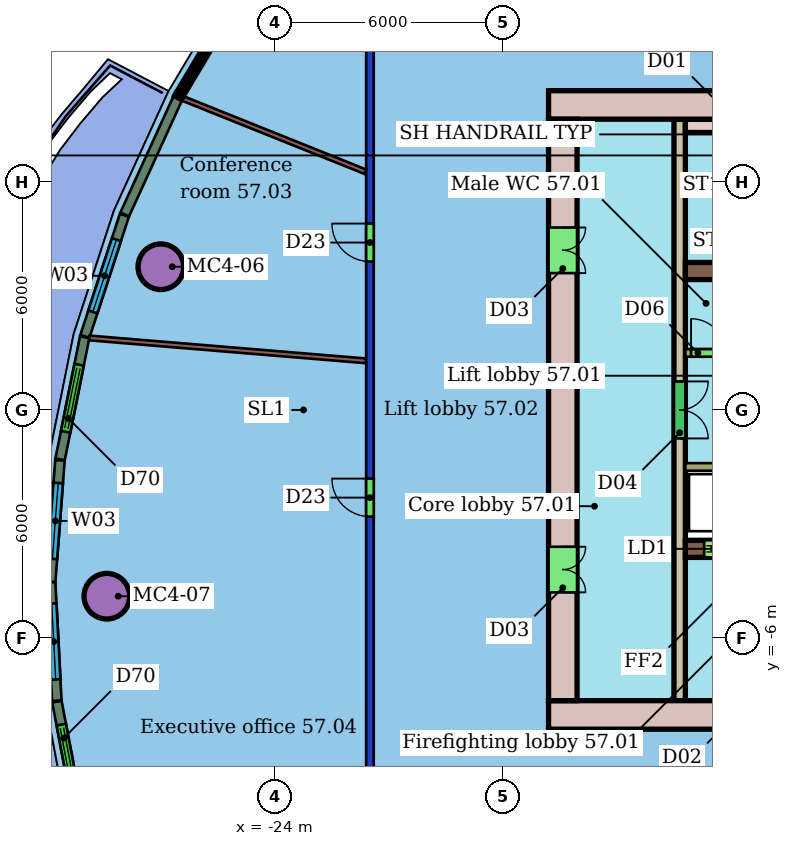
"""IFC4 building model, lengths in metres.
Left out: names, types, materials, properties, quantities, classifications, styles, units other than length and angle.
Written with IfcOpenShell. Run it as: python <this file> out.ifc"""

import sys

from ifc_helpers import new_model, si_unit, direction, frame, frame_2d, origin, origin_2d, place, context, subcontext, project, spatial, rectangle, hollow_circle, extrude, element, fill, save


model = new_model("IFC4")
c1 = context("Model", 3, precision=1e-05, world=origin(), true_north=direction((0.0, 1.0)))
c2 = subcontext(c1, "Body", "Model", "MODEL_VIEW")
j1 = project(units=[si_unit("LENGTHUNIT", "METRE"), si_unit("PLANEANGLEUNIT", "RADIAN")], contexts=[c1])
p1 = place(None, origin())
s1 = spatial("IfcSite", under=j1, at=p1, CompositionType="ELEMENT")
p2 = place(p1, origin())
s2 = spatial("IfcBuilding", under=s1, at=p2, CompositionType="ELEMENT")
p3 = place(p2, frame((0.0, 0.0, 231.7)))
s3 = spatial("IfcBuildingStorey", under=s2, at=p3, CompositionType="ELEMENT", Elevation=231.7)
for number, where, z_axis, x_axis in (
    (1, (-27.003, 3.768, 0.0), (0.0, 0.0, 1.0), (1.0, 0.0, 0.0)),
    (2, (-28.424, -4.901, 0.0), (0.0, 0.0, 1.0), (1.0, 0.0, 0.0)),
):
    element("IfcColumn", number, at=place(p3, frame(where, z_axis=z_axis, x_axis=x_axis)), inside=s3, PredefinedType="COLUMN", context=c2, shape_type="SweptSolid", body=[
        extrude(hollow_circle(Radius=0.6, WallThickness=0.045, at=origin_2d()), origin(), (0.0, 0.0, 1.0), 3.45),
    ])
p4 = place(p3, frame((-21.5, -10.4, 0.0), z_axis=(0.0, 0.0, 1.0), x_axis=(0.0, 1.0, 0.0)))
e3 = element("IfcWall", 3, at=p4, inside=s3, PredefinedType="PARTITIONING", context=c2, shape_type="SweptSolid", body=[
    extrude(rectangle(XDim=20.8, YDim=0.2, at=frame_2d((10.4, 0.0))), origin(), (0.0, 0.0, 1.0), 3.05),
])
p5 = place(p4, frame((14.304, 0.0, 0.0)))
e4 = element("IfcOpeningElement", 4, at=p5, cuts=e3, PredefinedType="OPENING", context=c2, shape_type="SweptSolid", body=[
    extrude(rectangle(XDim=1.0, YDim=2.4, at=frame_2d((0.5, 1.2))), frame((0.0, 0.11, 0.0), z_axis=(0.0, -1.0, 0.0), x_axis=(1.0, 0.0, 0.0)), (0.0, 0.0, 1.0), 0.22),
])
p6 = place(p4, frame((7.593, 0.0, 0.0)))
e5 = element("IfcOpeningElement", 5, at=p6, cuts=e3, PredefinedType="OPENING", context=c2, shape_type="SweptSolid", body=[
    extrude(rectangle(XDim=1.0, YDim=2.4, at=frame_2d((0.5, 1.2))), frame((0.0, 0.11, 0.0), z_axis=(0.0, -1.0, 0.0), x_axis=(1.0, 0.0, 0.0)), (0.0, 0.0, 1.0), 0.22),
])
p7 = place(p3, frame((-26.423, 8.194, 0.0), z_axis=(0.0, 0.0, 1.0), x_axis=(0.928078954296, -0.372383477872, 0.0)))
e6 = element("IfcWall", 6, at=p7, inside=s3, PredefinedType="PARTITIONING", context=c2, shape_type="SweptSolid", body=[
    extrude(rectangle(XDim=5.171, YDim=0.125, at=frame_2d((2.586, 0.0))), origin(), (0.0, 0.0, 1.0), 3.45),
])
p8 = place(p3, frame((-28.884, 1.894, 0.0), z_axis=(0.0, 0.0, 1.0), x_axis=(0.996590797754, -0.08250322316, 0.0)))
e7 = element("IfcWall", 7, at=p8, inside=s3, PredefinedType="PARTITIONING", context=c2, shape_type="SweptSolid", body=[
    extrude(rectangle(XDim=7.303, YDim=0.125, at=frame_2d((3.652, 0.0))), origin(), (0.0, 0.0, 1.0), 3.45),
])
p9 = place(p3, frame((-26.556, 8.202, 0.0), z_axis=(0.0, 0.0, 1.0), x_axis=(-0.415284514337, -0.909691580785, 0.0)))
e8 = element("IfcWall", 8, at=p9, inside=s3, PredefinedType="SOLIDWALL", context=c2, shape_type="SweptSolid", body=[
    extrude(rectangle(XDim=3.363, YDim=0.25, at=frame_2d((1.682, 0.0))), origin(), (0.0, 0.0, 1.0), 3.1),
])
p10 = place(p3, frame((-27.961, 5.122, 0.0), z_axis=(0.0, 0.0, 1.0), x_axis=(-0.310298321168, -0.950639233295, 0.0)))
e9 = element("IfcWall", 9, at=p10, inside=s3, PredefinedType="SOLIDWALL", context=c2, shape_type="SweptSolid", body=[
    extrude(rectangle(XDim=3.351, YDim=0.25, at=frame_2d((1.676, 0.0))), origin(), (0.0, 0.0, 1.0), 3.1),
])
p11 = place(p10, frame((0.676, 0.0, 0.9)))
e10 = element("IfcOpeningElement", 10, at=p11, cuts=e9, PredefinedType="OPENING", context=c2, shape_type="SweptSolid", body=[
    extrude(rectangle(XDim=2.0, YDim=2.1, at=frame_2d((1.0, 1.05))), frame((0.0, 0.135, 0.0), z_axis=(0.0, -1.0, 0.0), x_axis=(1.0, 0.0, 0.0)), (0.0, 0.0, 1.0), 0.27),
])
p12 = place(p3, frame((-29.007, 1.915, 0.0), z_axis=(0.0, 0.0, 1.0), x_axis=(-0.197275160693, -0.980348158041, 0.0)))
e11 = element("IfcWall", 11, at=p12, inside=s3, PredefinedType="SOLIDWALL", context=c2, shape_type="SweptSolid", body=[
    extrude(rectangle(XDim=3.281, YDim=0.25, at=frame_2d((1.64, 0.0))), origin(), (0.0, 0.0, 1.0), 3.1),
])
p13 = place(p12, frame((0.74, 0.0, 0.0)))
e12 = element("IfcOpeningElement", 12, at=p13, cuts=e11, PredefinedType="OPENING", context=c2, shape_type="SweptSolid", body=[
    extrude(rectangle(XDim=1.8, YDim=2.4, at=frame_2d((0.9, 1.2))), frame((0.0, 0.135, 0.0), z_axis=(0.0, -1.0, 0.0), x_axis=(1.0, 0.0, 0.0)), (0.0, 0.0, 1.0), 0.27),
])
p14 = place(p3, frame((-29.657, -1.324, 0.0), z_axis=(0.0, 0.0, 1.0), x_axis=(-0.076358161895, -0.997080453681, 0.0)))
e13 = element("IfcWall", 13, at=p14, inside=s3, PredefinedType="SOLIDWALL", context=c2, shape_type="SweptSolid", body=[
    extrude(rectangle(XDim=3.2, YDim=0.25, at=frame_2d((1.6, 0.0))), origin(), (0.0, 0.0, 1.0), 3.1),
])
p15 = place(p14, frame((0.6, 0.0, 0.9)))
e14 = element("IfcOpeningElement", 14, at=p15, cuts=e13, PredefinedType="OPENING", context=c2, shape_type="SweptSolid", body=[
    extrude(rectangle(XDim=2.0, YDim=2.1, at=frame_2d((1.0, 1.05))), frame((0.0, 0.135, 0.0), z_axis=(0.0, -1.0, 0.0), x_axis=(1.0, 0.0, 0.0)), (0.0, 0.0, 1.0), 0.27),
])
p16 = place(p3, frame((-29.902, -4.54, 0.0), z_axis=(0.0, 0.0, 1.0), x_axis=(0.051884190685, -0.99865310832, 0.0)))
e15 = element("IfcWall", 15, at=p16, inside=s3, PredefinedType="SOLIDWALL", context=c2, shape_type="SweptSolid", body=[
    extrude(rectangle(XDim=3.115, YDim=0.25, at=frame_2d((1.558, 0.0))), origin(), (0.0, 0.0, 1.0), 3.1),
])
p17 = place(p16, frame((0.558, 0.0, 0.9)))
e16 = element("IfcOpeningElement", 16, at=p17, cuts=e15, PredefinedType="OPENING", context=c2, shape_type="SweptSolid", body=[
    extrude(rectangle(XDim=2.0, YDim=2.1, at=frame_2d((1.0, 1.05))), frame((0.0, 0.135, 0.0), z_axis=(0.0, -1.0, 0.0), x_axis=(1.0, 0.0, 0.0)), (0.0, 0.0, 1.0), 0.27),
])
p18 = place(p3, frame((-29.737, -7.675, 0.0), z_axis=(0.0, 0.0, 1.0), x_axis=(0.186112401934, -0.982528459561, 0.0)))
e17 = element("IfcWall", 17, at=p18, inside=s3, PredefinedType="SOLIDWALL", context=c2, shape_type="SweptSolid", body=[
    extrude(rectangle(XDim=3.03, YDim=0.25, at=frame_2d((1.515, 0.0))), origin(), (0.0, 0.0, 1.0), 3.1),
])
p19 = place(p18, frame((0.615, 0.0, 0.0)))
e18 = element("IfcOpeningElement", 18, at=p19, cuts=e17, PredefinedType="OPENING", context=c2, shape_type="SweptSolid", body=[
    extrude(rectangle(XDim=1.8, YDim=2.4, at=frame_2d((0.9, 1.2))), frame((0.0, 0.135, 0.0), z_axis=(0.0, -1.0, 0.0), x_axis=(1.0, 0.0, 0.0)), (0.0, 0.0, 1.0), 0.27),
])
p20 = place(p3, frame((-6.0, 8.025, 0.0), z_axis=(0.0, 0.0, 1.0), x_axis=(-1.0, 0.0, 0.0)))
e19 = element("IfcWall", 19, at=p20, inside=s3, PredefinedType="SHEAR", context=c2, shape_type="SweptSolid", body=[
    extrude(rectangle(XDim=10.8, YDim=0.75, at=frame_2d((5.4, 0.0))), origin(), (0.0, 0.0, 1.0), 3.3),
])
p21 = place(p20, frame((5.2, 0.0, 0.0)))
e20 = element("IfcOpeningElement", 20, at=p21, cuts=e19, PredefinedType="OPENING", context=c2, shape_type="SweptSolid", body=[
    extrude(rectangle(XDim=1.2, YDim=2.1, at=frame_2d((0.6, 1.05))), frame((0.0, 0.385, 0.0), z_axis=(0.0, -1.0, 0.0), x_axis=(1.0, 0.0, 0.0)), (0.0, 0.0, 1.0), 0.77),
])
p22 = place(p3, frame((-16.8, -8.025, 0.0), z_axis=(0.0, 0.0, 1.0), x_axis=(1.0, 0.0, 0.0)))
e21 = element("IfcWall", 21, at=p22, inside=s3, PredefinedType="SHEAR", context=c2, shape_type="SweptSolid", body=[
    extrude(rectangle(XDim=21.6, YDim=0.75, at=frame_2d((10.8, 0.0))), origin(), (0.0, 0.0, 1.0), 3.3),
])
p23 = place(p22, frame((4.8, 0.0, 0.0)))
e22 = element("IfcOpeningElement", 22, at=p23, cuts=e21, PredefinedType="OPENING", context=c2, shape_type="SweptSolid", body=[
    extrude(rectangle(XDim=1.2, YDim=2.1, at=frame_2d((0.6, 1.05))), frame((0.0, 0.385, 0.0), z_axis=(0.0, -1.0, 0.0), x_axis=(1.0, 0.0, 0.0)), (0.0, 0.0, 1.0), 0.77),
])
p24 = place(p3, frame((-16.425, 7.65, 0.0), z_axis=(0.0, 0.0, 1.0), x_axis=(0.0, -1.0, 0.0)))
e23 = element("IfcWall", 23, at=p24, inside=s3, PredefinedType="SHEAR", context=c2, shape_type="SweptSolid", body=[
    extrude(rectangle(XDim=15.3, YDim=0.75, at=frame_2d((7.65, 0.0))), origin(), (0.0, 0.0, 1.0), 3.3),
])
p25 = place(p24, frame((11.25, 0.0, 0.0)))
e24 = element("IfcOpeningElement", 24, at=p25, cuts=e23, PredefinedType="OPENING", context=c2, shape_type="SweptSolid", body=[
    extrude(rectangle(XDim=1.2, YDim=2.1, at=frame_2d((0.6, 1.05))), frame((0.0, 0.385, 0.0), z_axis=(0.0, -1.0, 0.0), x_axis=(1.0, 0.0, 0.0)), (0.0, 0.0, 1.0), 0.77),
])
p26 = place(p24, frame((2.85, 0.0, 0.0)))
e25 = element("IfcOpeningElement", 25, at=p26, cuts=e23, PredefinedType="OPENING", context=c2, shape_type="SweptSolid", body=[
    extrude(rectangle(XDim=1.2, YDim=2.1, at=frame_2d((0.6, 1.05))), frame((0.0, 0.385, 0.0), z_axis=(0.0, -1.0, 0.0), x_axis=(1.0, 0.0, 0.0)), (0.0, 0.0, 1.0), 0.77),
])
p27 = place(p3, frame((-13.2, 3.655, 0.0), z_axis=(0.0, 0.0, 1.0), x_axis=(1.0, 0.0, 0.0)))
e26 = element("IfcWall", 26, at=p27, inside=s3, PredefinedType="SHEAR", context=c2, shape_type="SweptSolid", body=[
    extrude(rectangle(XDim=7.2, YDim=0.45, at=frame_2d((3.6, 0.0))), origin(), (0.0, 0.0, 1.0), 3.3),
])
p28 = place(p3, frame((-13.2, -3.655, 0.0), z_axis=(0.0, 0.0, 1.0), x_axis=(1.0, 0.0, 0.0)))
e27 = element("IfcWall", 27, at=p28, inside=s3, PredefinedType="SHEAR", context=c2, shape_type="SweptSolid", body=[
    extrude(rectangle(XDim=7.2, YDim=0.45, at=frame_2d((3.6, 0.0))), origin(), (0.0, 0.0, 1.0), 3.3),
])
p29 = place(p28, frame((0.496, 0.0, 0.0)))
e28 = element("IfcOpeningElement", 28, at=p29, cuts=e27, PredefinedType="OPENING", context=c2, shape_type="SweptSolid", body=[
    extrude(rectangle(XDim=1.2, YDim=2.1, at=frame_2d((0.6, 1.05))), frame((0.0, 0.235, 0.0), z_axis=(0.0, -1.0, 0.0), x_axis=(1.0, 0.0, 0.0)), (0.0, 0.0, 1.0), 0.47),
])
p30 = place(p28, frame((2.938, 0.0, 0.0)))
e29 = element("IfcOpeningElement", 29, at=p30, cuts=e27, PredefinedType="OPENING", context=c2, shape_type="SweptSolid", body=[
    extrude(rectangle(XDim=1.2, YDim=2.1, at=frame_2d((0.6, 1.05))), frame((0.0, 0.235, 0.0), z_axis=(0.0, -1.0, 0.0), x_axis=(1.0, 0.0, 0.0)), (0.0, 0.0, 1.0), 0.47),
])
p31 = place(p3, frame((-13.35, 7.65, 0.0), z_axis=(0.0, 0.0, 1.0), x_axis=(0.0, -1.0, 0.0)))
e30 = element("IfcWall", 30, at=p31, inside=s3, PredefinedType="SHEAR", context=c2, shape_type="SweptSolid", body=[
    extrude(rectangle(XDim=15.3, YDim=0.3, at=frame_2d((7.65, 0.0))), origin(), (0.0, 0.0, 1.0), 3.3),
])
p32 = place(p31, frame((6.9, 0.0, 0.0)))
e31 = element("IfcOpeningElement", 31, at=p32, cuts=e30, PredefinedType="OPENING", context=c2, shape_type="SweptSolid", body=[
    extrude(rectangle(XDim=1.5, YDim=2.1, at=frame_2d((0.75, 1.05))), frame((0.0, 0.16, 0.0), z_axis=(0.0, -1.0, 0.0), x_axis=(1.0, 0.0, 0.0)), (0.0, 0.0, 1.0), 0.32),
])
p33 = place(p3, frame((-13.2, 1.5, 0.0), z_axis=(0.0, 0.0, 1.0), x_axis=(1.0, 0.0, 0.0)))
e32 = element("IfcWall", 32, at=p33, inside=s3, PredefinedType="SHEAR", context=c2, shape_type="SweptSolid", body=[
    extrude(rectangle(XDim=14.4, YDim=0.2, at=frame_2d((7.2, 0.0))), origin(), (0.0, 0.0, 1.0), 3.3),
])
p34 = place(p33, frame((10.312, 0.0, 0.0)))
e33 = element("IfcOpeningElement", 33, at=p34, cuts=e32, PredefinedType="OPENING", context=c2, shape_type="SweptSolid", body=[
    extrude(rectangle(XDim=1.1, YDim=2.1, at=frame_2d((0.55, 1.05))), frame((0.0, 0.11, 0.0), z_axis=(0.0, -1.0, 0.0), x_axis=(1.0, 0.0, 0.0)), (0.0, 0.0, 1.0), 0.22),
])
p35 = place(p33, frame((12.754, 0.0, 0.0)))
e34 = element("IfcOpeningElement", 34, at=p35, cuts=e32, PredefinedType="OPENING", context=c2, shape_type="SweptSolid", body=[
    extrude(rectangle(XDim=1.1, YDim=2.1, at=frame_2d((0.55, 1.05))), frame((0.0, 0.11, 0.0), z_axis=(0.0, -1.0, 0.0), x_axis=(1.0, 0.0, 0.0)), (0.0, 0.0, 1.0), 0.22),
])
p36 = place(p33, frame((0.15, 0.0, 0.0)))
e35 = element("IfcOpeningElement", 35, at=p36, cuts=e32, PredefinedType="OPENING", context=c2, shape_type="SweptSolid", body=[
    extrude(rectangle(XDim=0.9, YDim=2.1, at=frame_2d((0.45, 1.05))), frame((0.0, 0.11, 0.0), z_axis=(0.0, -1.0, 0.0), x_axis=(1.0, 0.0, 0.0)), (0.0, 0.0, 1.0), 0.22),
])
p37 = place(p33, frame((3.365, 0.0, 0.0)))
e36 = element("IfcOpeningElement", 36, at=p37, cuts=e32, PredefinedType="OPENING", context=c2, shape_type="SweptSolid", body=[
    extrude(rectangle(XDim=1.0, YDim=2.1, at=frame_2d((0.5, 1.05))), frame((0.0, 0.11, 0.0), z_axis=(0.0, -1.0, 0.0), x_axis=(1.0, 0.0, 0.0)), (0.0, 0.0, 1.0), 0.22),
])
p38 = place(p33, frame((8.467, 0.0, 0.0)))
e37 = element("IfcOpeningElement", 37, at=p38, cuts=e32, PredefinedType="OPENING", context=c2, shape_type="SweptSolid", body=[
    extrude(rectangle(XDim=0.9, YDim=2.1, at=frame_2d((0.45, 1.05))), frame((0.0, 0.11, 0.0), z_axis=(0.0, -1.0, 0.0), x_axis=(1.0, 0.0, 0.0)), (0.0, 0.0, 1.0), 0.22),
])
p39 = place(p3, frame((1.2, -1.5, 0.0), z_axis=(0.0, 0.0, 1.0), x_axis=(-1.0, 0.0, 0.0)))
e38 = element("IfcWall", 38, at=p39, inside=s3, PredefinedType="SHEAR", context=c2, shape_type="SweptSolid", body=[
    extrude(rectangle(XDim=14.4, YDim=0.2, at=frame_2d((7.2, 0.0))), origin(), (0.0, 0.0, 1.0), 3.3),
])
p40 = place(p39, frame((7.821, 0.0, 0.0)))
e39 = element("IfcOpeningElement", 39, at=p40, cuts=e38, PredefinedType="OPENING", context=c2, shape_type="SweptSolid", body=[
    extrude(rectangle(XDim=1.2, YDim=2.1, at=frame_2d((0.6, 1.05))), frame((0.0, 0.11, 0.0), z_axis=(0.0, -1.0, 0.0), x_axis=(1.0, 0.0, 0.0)), (0.0, 0.0, 1.0), 0.22),
])
p41 = place(p39, frame((0.546, 0.0, 0.0)))
e40 = element("IfcOpeningElement", 40, at=p41, cuts=e38, PredefinedType="OPENING", context=c2, shape_type="SweptSolid", body=[
    extrude(rectangle(XDim=1.1, YDim=2.1, at=frame_2d((0.55, 1.05))), frame((0.0, 0.11, 0.0), z_axis=(0.0, -1.0, 0.0), x_axis=(1.0, 0.0, 0.0)), (0.0, 0.0, 1.0), 0.22),
])
p42 = place(p39, frame((4.335, 0.0, 0.0)))
e41 = element("IfcOpeningElement", 41, at=p42, cuts=e38, PredefinedType="OPENING", context=c2, shape_type="SweptSolid", body=[
    extrude(rectangle(XDim=1.0, YDim=2.1, at=frame_2d((0.5, 1.05))), frame((0.0, 0.11, 0.0), z_axis=(0.0, -1.0, 0.0), x_axis=(1.0, 0.0, 0.0)), (0.0, 0.0, 1.0), 0.22),
])
p43 = place(p39, frame((2.592, 0.0, 0.0)))
e42 = element("IfcOpeningElement", 42, at=p43, cuts=e38, PredefinedType="OPENING", context=c2, shape_type="SweptSolid", body=[
    extrude(rectangle(XDim=1.0, YDim=2.1, at=frame_2d((0.5, 1.05))), frame((0.0, 0.11, 0.0), z_axis=(0.0, -1.0, 0.0), x_axis=(1.0, 0.0, 0.0)), (0.0, 0.0, 1.0), 0.22),
])
p44 = place(p3, frame((-13.2, 7.475, 0.0), z_axis=(0.0, 0.0, 1.0), x_axis=(1.0, 0.0, 0.0)))
e43 = element("IfcWall", 43, at=p44, inside=s3, PredefinedType="SHEAR", context=c2, shape_type="SweptSolid", body=[
    extrude(rectangle(XDim=0.8, YDim=0.35, at=frame_2d((0.4, 0.0))), origin(), (0.0, 0.0, 1.0), 3.3),
])
p45 = place(p5, origin())
e44 = element("IfcDoor", 44, at=p45, inside=s3, OperationType="SINGLE_SWING_RIGHT", PredefinedType="DOOR", context=c2, shape_type="SweptSolid", body=[
    extrude(rectangle(XDim=1.0, YDim=2.4, at=frame_2d((0.5, 1.2))), frame((0.0, 0.025, 0.0), z_axis=(0.0, -1.0, 0.0), x_axis=(1.0, 0.0, 0.0)), (0.0, 0.0, 1.0), 0.05),
])
fill(e4, e44)
p46 = place(p6, origin())
e45 = element("IfcDoor", 45, at=p46, inside=s3, OperationType="SINGLE_SWING_RIGHT", PredefinedType="DOOR", context=c2, shape_type="SweptSolid", body=[
    extrude(rectangle(XDim=1.0, YDim=2.4, at=frame_2d((0.5, 1.2))), frame((0.0, 0.025, 0.0), z_axis=(0.0, -1.0, 0.0), x_axis=(1.0, 0.0, 0.0)), (0.0, 0.0, 1.0), 0.05),
])
fill(e5, e45)
p47 = place(p11, origin())
e46 = element("IfcWindow", 46, at=p47, inside=s3, PartitioningType="SINGLE_PANEL", PredefinedType="WINDOW", context=c2, shape_type="SweptSolid", body=[
    extrude(rectangle(XDim=2.0, YDim=2.1, at=frame_2d((1.0, 1.05))), frame((0.0, 0.03, 0.0), z_axis=(0.0, -1.0, 0.0), x_axis=(1.0, 0.0, 0.0)), (0.0, 0.0, 1.0), 0.06),
])
fill(e10, e46)
p48 = place(p13, origin())
e47 = element("IfcDoor", 47, at=p48, inside=s3, OperationType="DOUBLE_DOOR_SLIDING", PredefinedType="DOOR", context=c2, shape_type="SweptSolid", body=[
    extrude(rectangle(XDim=1.8, YDim=2.4, at=frame_2d((0.9, 1.2))), frame((0.0, 0.025, 0.0), z_axis=(0.0, -1.0, 0.0), x_axis=(1.0, 0.0, 0.0)), (0.0, 0.0, 1.0), 0.05),
])
fill(e12, e47)
p49 = place(p15, origin())
e48 = element("IfcWindow", 48, at=p49, inside=s3, PartitioningType="SINGLE_PANEL", PredefinedType="WINDOW", context=c2, shape_type="SweptSolid", body=[
    extrude(rectangle(XDim=2.0, YDim=2.1, at=frame_2d((1.0, 1.05))), frame((0.0, 0.03, 0.0), z_axis=(0.0, -1.0, 0.0), x_axis=(1.0, 0.0, 0.0)), (0.0, 0.0, 1.0), 0.06),
])
fill(e14, e48)
p50 = place(p17, origin())
e49 = element("IfcWindow", 49, at=p50, inside=s3, PartitioningType="SINGLE_PANEL", PredefinedType="WINDOW", context=c2, shape_type="SweptSolid", body=[
    extrude(rectangle(XDim=2.0, YDim=2.1, at=frame_2d((1.0, 1.05))), frame((0.0, 0.03, 0.0), z_axis=(0.0, -1.0, 0.0), x_axis=(1.0, 0.0, 0.0)), (0.0, 0.0, 1.0), 0.06),
])
fill(e16, e49)
p51 = place(p19, origin())
e50 = element("IfcDoor", 50, at=p51, inside=s3, OperationType="DOUBLE_DOOR_SLIDING", PredefinedType="DOOR", context=c2, shape_type="SweptSolid", body=[
    extrude(rectangle(XDim=1.8, YDim=2.4, at=frame_2d((0.9, 1.2))), frame((0.0, 0.025, 0.0), z_axis=(0.0, -1.0, 0.0), x_axis=(1.0, 0.0, 0.0)), (0.0, 0.0, 1.0), 0.05),
])
fill(e18, e50)
p52 = place(p25, origin())
e51 = element("IfcDoor", 51, at=p52, inside=s3, OperationType="DOUBLE_DOOR_SINGLE_SWING", PredefinedType="NOTDEFINED", context=c2, shape_type="SweptSolid", body=[
    extrude(rectangle(XDim=1.2, YDim=2.1, at=frame_2d((0.6, 1.05))), frame((0.0, 0.025, 0.0), z_axis=(0.0, -1.0, 0.0), x_axis=(1.0, 0.0, 0.0)), (0.0, 0.0, 1.0), 0.05),
])
fill(e24, e51)
p53 = place(p26, origin())
e52 = element("IfcDoor", 52, at=p53, inside=s3, OperationType="DOUBLE_DOOR_SINGLE_SWING", PredefinedType="NOTDEFINED", context=c2, shape_type="SweptSolid", body=[
    extrude(rectangle(XDim=1.2, YDim=2.1, at=frame_2d((0.6, 1.05))), frame((0.0, 0.025, 0.0), z_axis=(0.0, -1.0, 0.0), x_axis=(1.0, 0.0, 0.0)), (0.0, 0.0, 1.0), 0.05),
])
fill(e25, e52)
p54 = place(p29, origin())
e53 = element("IfcDoor", 53, at=p54, inside=s3, OperationType="DOUBLE_DOOR_SLIDING", PredefinedType="NOTDEFINED", context=c2, shape_type="SweptSolid", body=[
    extrude(rectangle(XDim=1.2, YDim=2.1, at=frame_2d((0.6, 1.05))), frame((0.0, 0.025, 0.0), z_axis=(0.0, -1.0, 0.0), x_axis=(1.0, 0.0, 0.0)), (0.0, 0.0, 1.0), 0.05),
])
fill(e28, e53)
p55 = place(p32, origin())
e54 = element("IfcDoor", 54, at=p55, inside=s3, OperationType="DOUBLE_DOOR_SINGLE_SWING", PredefinedType="NOTDEFINED", context=c2, shape_type="SweptSolid", body=[
    extrude(rectangle(XDim=1.5, YDim=2.1, at=frame_2d((0.75, 1.05))), frame((0.0, 0.025, 0.0), z_axis=(0.0, -1.0, 0.0), x_axis=(1.0, 0.0, 0.0)), (0.0, 0.0, 1.0), 0.05),
])
fill(e31, e54)
p56 = place(p36, origin())
e55 = element("IfcDoor", 55, at=p56, inside=s3, OperationType="SINGLE_SWING_LEFT", PredefinedType="NOTDEFINED", context=c2, shape_type="SweptSolid", body=[
    extrude(rectangle(XDim=0.9, YDim=2.1, at=frame_2d((0.45, 1.05))), frame((0.0, 0.025, 0.0), z_axis=(0.0, -1.0, 0.0), x_axis=(1.0, 0.0, 0.0)), (0.0, 0.0, 1.0), 0.05),
])
fill(e35, e55)
save(model, sys.argv[1])
